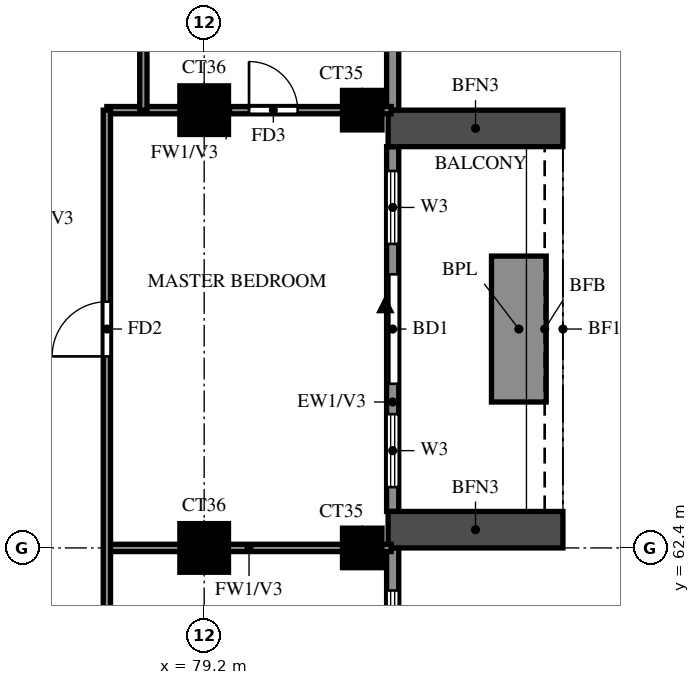
"""IFC4 building model, lengths in metres.
Left out: names, types, materials, properties, quantities, classifications, styles, units other than length and angle.
Written with IfcOpenShell. Run it as: python <this file> out.ifc"""

import sys

from ifc_helpers import new_model, si_unit, direction, frame, frame_2d, origin, origin_2d, place, context, subcontext, project, spatial, rectangle, extrude, source, transform, mapped, element, fill, save


model = new_model("IFC4")
c1 = context("Model", 3, precision=1e-05, world=origin(), true_north=direction((0.0, 1.0)))
c2 = subcontext(c1, "Body", "Model", "MODEL_VIEW")
j1 = project(units=[si_unit("LENGTHUNIT", "METRE"), si_unit("PLANEANGLEUNIT", "RADIAN")], contexts=[c1])
p1 = place(None, origin())
s1 = spatial("IfcSite", under=j1, at=p1, CompositionType="ELEMENT")
p2 = place(p1, origin())
s2 = spatial("IfcBuilding", under=s1, at=p2, CompositionType="ELEMENT")
p3 = place(p2, frame((0.0, 0.0, 250.0)))
s3 = spatial("IfcBuildingStorey", under=s2, at=p3, CompositionType="ELEMENT", Elevation=250.0)
m1 = source(origin(), c2, "Body", "SweptSolid", [
    extrude(rectangle(XDim=0.8, YDim=0.8, at=origin_2d()), origin(), (0.0, 0.0, 1.0), 3.22),
])
p4 = place(p3, frame((79.2, 62.4, 0.0), z_axis=(0.0, 0.0, 1.0), x_axis=(1.0, 0.0, 0.0)))
e1 = element("IfcColumn", 1, at=p4, inside=s3, PredefinedType="COLUMN", context=c2, shape_type="MappedRepresentation", body=[
    mapped(m1, transform((0.0, 0.0, 0.0))),
])
m2 = source(origin(), c2, "Body", "SweptSolid", [
    extrude(rectangle(XDim=0.65, YDim=0.65, at=origin_2d()), origin(), (0.0, 0.0, 1.0), 3.22),
])
p5 = place(p3, frame((81.8, 62.4, 0.0), z_axis=(0.0, 0.0, 1.0), x_axis=(1.0, 0.0, 0.0)))
e2 = element("IfcColumn", 2, at=p5, inside=s3, PredefinedType="COLUMN", context=c2, shape_type="MappedRepresentation", body=[
    mapped(m2, transform((0.0, 0.0, 0.0))),
])
p6 = place(p3, frame((79.2, 69.6, 0.0), z_axis=(0.0, 0.0, 1.0), x_axis=(1.0, 0.0, 0.0)))
e3 = element("IfcColumn", 3, at=p6, inside=s3, PredefinedType="COLUMN", context=c2, shape_type="MappedRepresentation", body=[
    mapped(m1, transform((0.0, 0.0, 0.0))),
])
p7 = place(p3, frame((81.8, 69.6, 0.0), z_axis=(0.0, 0.0, 1.0), x_axis=(1.0, 0.0, 0.0)))
e4 = element("IfcColumn", 4, at=p7, inside=s3, PredefinedType="COLUMN", context=c2, shape_type="MappedRepresentation", body=[
    mapped(m2, transform((0.0, 0.0, 0.0))),
])
p8 = place(p3, frame((82.3, 48.2, 0.0), z_axis=(0.0, 0.0, 1.0), x_axis=(0.0, 1.0, 0.0)))
e5 = element("IfcWall", 5, at=p8, inside=s3, PredefinedType="SOLIDWALL", context=c2, shape_type="SweptSolid", body=[
    extrude(rectangle(XDim=14.2, YDim=0.2, at=frame_2d((7.1, 0.0))), origin(), (0.0, 0.0, 1.0), 3.22),
])
p9 = place(p8, frame((0.9, 0.0, 0.6)))
e6 = element("IfcOpeningElement", 6, at=p9, cuts=e5, PredefinedType="OPENING", context=c2, shape_type="SweptSolid", body=[
    extrude(rectangle(XDim=2.4, YDim=2.4, at=frame_2d((1.2, 1.2))), frame((0.0, 0.11, 0.0), z_axis=(0.0, -1.0, 0.0), x_axis=(1.0, 0.0, 0.0)), (0.0, 0.0, 1.0), 0.22),
])
p10 = place(p8, frame((3.9, 0.0, 0.6)))
e7 = element("IfcOpeningElement", 7, at=p10, cuts=e5, PredefinedType="OPENING", context=c2, shape_type="SweptSolid", body=[
    extrude(rectangle(XDim=2.4, YDim=2.4, at=frame_2d((1.2, 1.2))), frame((0.0, 0.11, 0.0), z_axis=(0.0, -1.0, 0.0), x_axis=(1.0, 0.0, 0.0)), (0.0, 0.0, 1.0), 0.22),
])
p11 = place(p8, frame((7.6, 0.0, 0.6)))
e8 = element("IfcOpeningElement", 8, at=p11, cuts=e5, PredefinedType="OPENING", context=c2, shape_type="SweptSolid", body=[
    extrude(rectangle(XDim=2.4, YDim=2.4, at=frame_2d((1.2, 1.2))), frame((0.0, 0.11, 0.0), z_axis=(0.0, -1.0, 0.0), x_axis=(1.0, 0.0, 0.0)), (0.0, 0.0, 1.0), 0.22),
])
p12 = place(p8, frame((11.1, 0.0, 0.6)))
e9 = element("IfcOpeningElement", 9, at=p12, cuts=e5, PredefinedType="OPENING", context=c2, shape_type="SweptSolid", body=[
    extrude(rectangle(XDim=2.4, YDim=2.4, at=frame_2d((1.2, 1.2))), frame((0.0, 0.11, 0.0), z_axis=(0.0, -1.0, 0.0), x_axis=(1.0, 0.0, 0.0)), (0.0, 0.0, 1.0), 0.22),
])
p13 = place(p3, frame((82.3, 63.0, 0.0), z_axis=(0.0, 0.0, 1.0), x_axis=(0.0, 1.0, 0.0)))
e10 = element("IfcWall", 10, at=p13, inside=s3, PredefinedType="SOLIDWALL", context=c2, shape_type="SweptSolid", body=[
    extrude(rectangle(XDim=6.0, YDim=0.2, at=frame_2d((3.0, 0.0))), origin(), (0.0, 0.0, 1.0), 3.22),
])
p14 = place(p13, frame((2.1, 0.0, 0.0)))
e11 = element("IfcOpeningElement", 11, at=p14, cuts=e10, PredefinedType="OPENING", context=c2, shape_type="SweptSolid", body=[
    extrude(rectangle(XDim=1.8, YDim=2.4, at=frame_2d((0.9, 1.2))), frame((0.0, 0.11, 0.0), z_axis=(0.0, -1.0, 0.0), x_axis=(1.0, 0.0, 0.0)), (0.0, 0.0, 1.0), 0.22),
])
p15 = place(p13, frame((0.4, 0.0, 0.6)))
e12 = element("IfcOpeningElement", 12, at=p15, cuts=e10, PredefinedType="OPENING", context=c2, shape_type="SweptSolid", body=[
    extrude(rectangle(XDim=1.2, YDim=2.4, at=frame_2d((0.6, 1.2))), frame((0.0, 0.11, 0.0), z_axis=(0.0, -1.0, 0.0), x_axis=(1.0, 0.0, 0.0)), (0.0, 0.0, 1.0), 0.22),
])
p16 = place(p13, frame((4.4, 0.0, 0.6)))
e13 = element("IfcOpeningElement", 13, at=p16, cuts=e10, PredefinedType="OPENING", context=c2, shape_type="SweptSolid", body=[
    extrude(rectangle(XDim=1.2, YDim=2.4, at=frame_2d((0.6, 1.2))), frame((0.0, 0.11, 0.0), z_axis=(0.0, -1.0, 0.0), x_axis=(1.0, 0.0, 0.0)), (0.0, 0.0, 1.0), 0.22),
])
p17 = place(p3, frame((82.3, 69.6, 0.0), z_axis=(0.0, 0.0, 1.0), x_axis=(0.0, 1.0, 0.0)))
e14 = element("IfcWall", 14, at=p17, inside=s3, PredefinedType="SOLIDWALL", context=c2, shape_type="SweptSolid", body=[
    extrude(rectangle(XDim=7.2, YDim=0.2, at=frame_2d((3.6, 0.0))), origin(), (0.0, 0.0, 1.0), 3.22),
])
p18 = place(p17, frame((1.45, 0.0, 1.5)))
e15 = element("IfcOpeningElement", 15, at=p18, cuts=e14, PredefinedType="OPENING", context=c2, shape_type="SweptSolid", body=[
    extrude(rectangle(XDim=0.9, YDim=0.9, at=frame_2d((0.45, 0.45))), frame((0.0, 0.11, 0.0), z_axis=(0.0, -1.0, 0.0), x_axis=(1.0, 0.0, 0.0)), (0.0, 0.0, 1.0), 0.22),
])
p19 = place(p17, frame((4.1, 0.0, 0.6)))
e16 = element("IfcOpeningElement", 16, at=p19, cuts=e14, PredefinedType="OPENING", context=c2, shape_type="SweptSolid", body=[
    extrude(rectangle(XDim=2.4, YDim=2.4, at=frame_2d((1.2, 1.2))), frame((0.0, 0.11, 0.0), z_axis=(0.0, -1.0, 0.0), x_axis=(1.0, 0.0, 0.0)), (0.0, 0.0, 1.0), 0.22),
])
for number, where, z_axis, x_axis in (
    (17, (82.225, 62.7, 0.0), (0.0, 0.0, 1.0), (1.0, 0.0, 0.0)),
    (18, (82.225, 69.3, 0.0), (0.0, 0.0, 1.0), (1.0, 0.0, 0.0)),
):
    element("IfcWall", number, at=place(p3, frame(where, z_axis=z_axis, x_axis=x_axis)), inside=s3, PredefinedType="SOLIDWALL", context=c2, shape_type="SweptSolid", body=[
        extrude(rectangle(XDim=2.875, YDim=0.6, at=frame_2d((1.438, 0.0))), origin(), (0.0, 0.0, 1.0), 2.85),
    ])
p20 = place(p3, frame((84.375, 64.8, 0.0), z_axis=(0.0, 0.0, 1.0), x_axis=(0.0, 1.0, 0.0)))
e19 = element("IfcWall", 19, at=p20, inside=s3, PredefinedType="SOLIDWALL", context=c2, shape_type="SweptSolid", body=[
    extrude(rectangle(XDim=2.4, YDim=0.9, at=frame_2d((1.2, 0.0))), origin(), (0.0, 0.0, 1.0), 0.9),
])
p21 = place(p3, frame((77.6, 62.4, 0.0), z_axis=(0.0, 0.0, 1.0), x_axis=(1.0, 0.0, 0.0)))
e20 = element("IfcWall", 20, at=p21, inside=s3, PredefinedType="PARTITIONING", context=c2, shape_type="SweptSolid", body=[
    extrude(rectangle(XDim=4.675, YDim=0.12, at=frame_2d((2.337, 0.0))), origin(), (0.0, 0.0, 1.0), 3.22),
])
p22 = place(p3, frame((77.6, 69.6, 0.0), z_axis=(0.0, 0.0, 1.0), x_axis=(1.0, 0.0, 0.0)))
e21 = element("IfcWall", 21, at=p22, inside=s3, PredefinedType="PARTITIONING", context=c2, shape_type="SweptSolid", body=[
    extrude(rectangle(XDim=4.675, YDim=0.12, at=frame_2d((2.337, 0.0))), origin(), (0.0, 0.0, 1.0), 3.22),
])
p23 = place(p22, frame((2.337, 0.0, 0.0)))
e22 = element("IfcOpeningElement", 22, at=p23, cuts=e21, PredefinedType="OPENING", context=c2, shape_type="SweptSolid", body=[
    extrude(rectangle(XDim=0.8, YDim=2.1, at=frame_2d((0.4, 1.05))), frame((0.0, 0.07, 0.0), z_axis=(0.0, -1.0, 0.0), x_axis=(1.0, 0.0, 0.0)), (0.0, 0.0, 1.0), 0.14),
])
p24 = place(p3, frame((77.6, 48.125, 0.0), z_axis=(0.0, 0.0, 1.0), x_axis=(0.0, 1.0, 0.0)))
e23 = element("IfcWall", 23, at=p24, inside=s3, PredefinedType="PARTITIONING", context=c2, shape_type="SweptSolid", body=[
    extrude(rectangle(XDim=21.475, YDim=0.12, at=frame_2d((10.738, 0.0))), origin(), (0.0, 0.0, 1.0), 3.22),
])
p25 = place(p24, frame((2.788, 0.0, 0.0)))
e24 = element("IfcOpeningElement", 24, at=p25, cuts=e23, PredefinedType="OPENING", context=c2, shape_type="SweptSolid", body=[
    extrude(rectangle(XDim=1.5, YDim=2.1, at=frame_2d((0.75, 1.05))), frame((0.0, 0.07, 0.0), z_axis=(0.0, -1.0, 0.0), x_axis=(1.0, 0.0, 0.0)), (0.0, 0.0, 1.0), 0.14),
])
p26 = place(p24, frame((8.425, 0.0, 0.0)))
e25 = element("IfcOpeningElement", 25, at=p26, cuts=e23, PredefinedType="OPENING", context=c2, shape_type="SweptSolid", body=[
    extrude(rectangle(XDim=0.9, YDim=2.1, at=frame_2d((0.45, 1.05))), frame((0.0, 0.07, 0.0), z_axis=(0.0, -1.0, 0.0), x_axis=(1.0, 0.0, 0.0)), (0.0, 0.0, 1.0), 0.14),
])
p27 = place(p24, frame((12.025, 0.0, 0.0)))
e26 = element("IfcOpeningElement", 26, at=p27, cuts=e23, PredefinedType="OPENING", context=c2, shape_type="SweptSolid", body=[
    extrude(rectangle(XDim=0.9, YDim=2.1, at=frame_2d((0.45, 1.05))), frame((0.0, 0.07, 0.0), z_axis=(0.0, -1.0, 0.0), x_axis=(1.0, 0.0, 0.0)), (0.0, 0.0, 1.0), 0.14),
])
p28 = place(p24, frame((17.425, 0.0, 0.0)))
e27 = element("IfcOpeningElement", 27, at=p28, cuts=e23, PredefinedType="OPENING", context=c2, shape_type="SweptSolid", body=[
    extrude(rectangle(XDim=0.9, YDim=2.1, at=frame_2d((0.45, 1.05))), frame((0.0, 0.07, 0.0), z_axis=(0.0, -1.0, 0.0), x_axis=(1.0, 0.0, 0.0)), (0.0, 0.0, 1.0), 0.14),
])
p29 = place(p3, frame((78.2, 69.6, 0.0), z_axis=(0.0, 0.0, 1.0), x_axis=(0.0, 1.0, 0.0)))
e28 = element("IfcWall", 28, at=p29, inside=s3, PredefinedType="PARTITIONING", context=c2, shape_type="SweptSolid", body=[
    extrude(rectangle(XDim=3.6, YDim=0.12, at=frame_2d((1.8, 0.0))), origin(), (0.0, 0.0, 1.0), 3.22),
])
p30 = place(p12, origin())
e29 = element("IfcWindow", 29, at=p30, inside=s3, PartitioningType="DOUBLE_PANEL_VERTICAL", PredefinedType="WINDOW", context=c2, shape_type="SweptSolid", body=[
    extrude(rectangle(XDim=2.4, YDim=2.4, at=frame_2d((1.2, 1.2))), frame((0.0, 0.03, 0.0), z_axis=(0.0, -1.0, 0.0), x_axis=(1.0, 0.0, 0.0)), (0.0, 0.0, 1.0), 0.06),
])
fill(e9, e29)
p31 = place(p14, origin())
e30 = element("IfcDoor", 30, at=p31, inside=s3, OperationType="DOUBLE_DOOR_SLIDING", PredefinedType="DOOR", context=c2, shape_type="SweptSolid", body=[
    extrude(rectangle(XDim=1.8, YDim=2.4, at=frame_2d((0.9, 1.2))), frame((0.0, 0.025, 0.0), z_axis=(0.0, -1.0, 0.0), x_axis=(1.0, 0.0, 0.0)), (0.0, 0.0, 1.0), 0.05),
])
fill(e11, e30)
p32 = place(p15, origin())
e31 = element("IfcWindow", 31, at=p32, inside=s3, PartitioningType="SINGLE_PANEL", PredefinedType="WINDOW", context=c2, shape_type="SweptSolid", body=[
    extrude(rectangle(XDim=1.2, YDim=2.4, at=frame_2d((0.6, 1.2))), frame((0.0, 0.03, 0.0), z_axis=(0.0, -1.0, 0.0), x_axis=(1.0, 0.0, 0.0)), (0.0, 0.0, 1.0), 0.06),
])
fill(e12, e31)
p33 = place(p16, origin())
e32 = element("IfcWindow", 32, at=p33, inside=s3, PartitioningType="SINGLE_PANEL", PredefinedType="WINDOW", context=c2, shape_type="SweptSolid", body=[
    extrude(rectangle(XDim=1.2, YDim=2.4, at=frame_2d((0.6, 1.2))), frame((0.0, 0.03, 0.0), z_axis=(0.0, -1.0, 0.0), x_axis=(1.0, 0.0, 0.0)), (0.0, 0.0, 1.0), 0.06),
])
fill(e13, e32)
p34 = place(p28, origin())
e33 = element("IfcDoor", 33, at=p34, inside=s3, OperationType="SINGLE_SWING_LEFT", PredefinedType="DOOR", context=c2, shape_type="SweptSolid", body=[
    extrude(rectangle(XDim=0.9, YDim=2.1, at=frame_2d((0.45, 1.05))), frame((0.0, 0.025, 0.0), z_axis=(0.0, -1.0, 0.0), x_axis=(1.0, 0.0, 0.0)), (0.0, 0.0, 1.0), 0.05),
])
fill(e27, e33)
p35 = place(p23, origin())
e34 = element("IfcDoor", 34, at=p35, inside=s3, OperationType="SINGLE_SWING_RIGHT", PredefinedType="DOOR", context=c2, shape_type="SweptSolid", body=[
    extrude(rectangle(XDim=0.8, YDim=2.1, at=frame_2d((0.4, 1.05))), frame((0.0, 0.025, 0.0), z_axis=(0.0, -1.0, 0.0), x_axis=(1.0, 0.0, 0.0)), (0.0, 0.0, 1.0), 0.05),
])
fill(e22, e34)
save(model, sys.argv[1])
